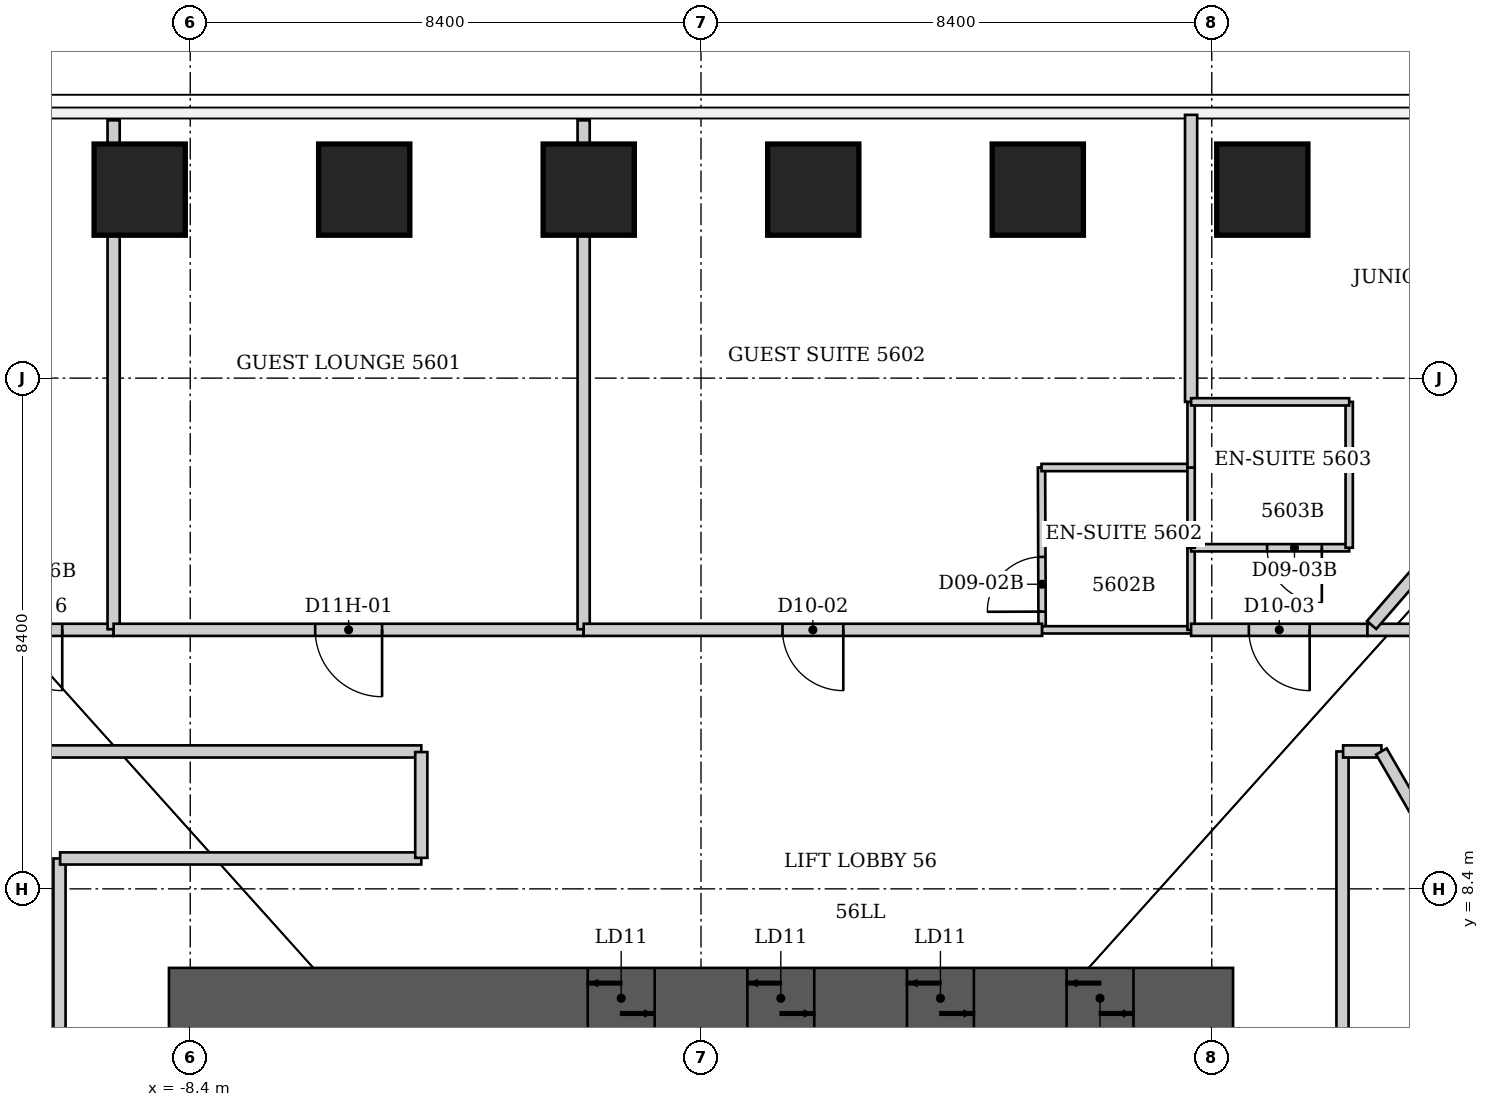
"""IFC4 building model, lengths in metres.
Left out: names, types, materials, properties, quantities, classifications, styles, units other than length and angle.
Written with IfcOpenShell. Run it as: python <this file> out.ifc"""

import sys

from ifc_helpers import new_model, si_unit, direction, frame, frame_2d, origin, origin_2d, place, context, subcontext, project, spatial, rectangle, extrude, element, fill, save


model = new_model("IFC4")
c1 = context("Model", 3, precision=1e-05, world=origin(), true_north=direction((0.0, 1.0)))
c2 = subcontext(c1, "Body", "Model", "MODEL_VIEW")
j1 = project(units=[si_unit("LENGTHUNIT", "METRE"), si_unit("PLANEANGLEUNIT", "RADIAN")], contexts=[c1])
p1 = place(None, origin())
s1 = spatial("IfcSite", under=j1, at=p1, CompositionType="ELEMENT")
p2 = place(p1, origin())
s2 = spatial("IfcBuilding", under=s1, at=p2, CompositionType="ELEMENT")
p3 = place(p2, frame((0.0, 0.0, 225.0)))
s3 = spatial("IfcBuildingStorey", under=s2, at=p3, CompositionType="ELEMENT", Elevation=225.0)
for number, where, z_axis, x_axis in (
    (1, (-9.231, 19.9, 0.0), (0.0, 0.0, 1.0), (0.0, 1.0, 0.0)),
    (2, (-5.539, 19.9, 0.0), (0.0, 0.0, 1.0), (0.0, 1.0, 0.0)),
    (3, (-1.846, 19.9, 0.0), (0.0, 0.0, 1.0), (0.0, 1.0, 0.0)),
    (4, (1.846, 19.9, 0.0), (0.0, 0.0, 1.0), (0.0, 1.0, 0.0)),
    (5, (5.539, 19.9, 0.0), (0.0, 0.0, 1.0), (0.0, 1.0, 0.0)),
    (6, (9.231, 19.9, 0.0), (0.0, 0.0, 1.0), (0.0, 1.0, 0.0)),
):
    element("IfcColumn", number, at=place(p3, frame(where, z_axis=z_axis, x_axis=x_axis)), inside=s3, PredefinedType="COLUMN", context=c2, shape_type="SweptSolid", body=[
        extrude(rectangle(XDim=1.5, YDim=1.5, at=origin_2d()), origin(), (0.0, 0.0, 1.0), 3.8),
    ])
p4 = place(p3, frame((-8.75, 6.6, 0.0), z_axis=(0.0, 0.0, 1.0), x_axis=(1.0, 0.0, 0.0)))
e7 = element("IfcWall", 7, at=p4, inside=s3, PredefinedType="SHEAR", context=c2, shape_type="SweptSolid", body=[
    extrude(rectangle(XDim=17.5, YDim=1.0, at=frame_2d((8.75, 0.0))), origin(), (0.0, 0.0, 1.0), 3.8),
])
p5 = place(p4, frame((6.887, 0.0, 0.0)))
e8 = element("IfcOpeningElement", 8, at=p5, cuts=e7, PredefinedType="OPENING", context=c2, shape_type="SweptSolid", body=[
    extrude(rectangle(XDim=1.1, YDim=2.1, at=frame_2d((0.55, 1.05))), frame((0.0, 0.5, 0.0), z_axis=(0.0, -1.0, 0.0), x_axis=(1.0, 0.0, 0.0)), (0.0, 0.0, 1.0), 1.0),
])
p6 = place(p4, frame((9.512, 0.0, 0.0)))
e9 = element("IfcOpeningElement", 9, at=p6, cuts=e7, PredefinedType="OPENING", context=c2, shape_type="SweptSolid", body=[
    extrude(rectangle(XDim=1.1, YDim=2.1, at=frame_2d((0.55, 1.05))), frame((0.0, 0.5, 0.0), z_axis=(0.0, -1.0, 0.0), x_axis=(1.0, 0.0, 0.0)), (0.0, 0.0, 1.0), 1.0),
])
p7 = place(p4, frame((12.137, 0.0, 0.0)))
e10 = element("IfcOpeningElement", 10, at=p7, cuts=e7, PredefinedType="OPENING", context=c2, shape_type="SweptSolid", body=[
    extrude(rectangle(XDim=1.1, YDim=2.1, at=frame_2d((0.55, 1.05))), frame((0.0, 0.5, 0.0), z_axis=(0.0, -1.0, 0.0), x_axis=(1.0, 0.0, 0.0)), (0.0, 0.0, 1.0), 1.0),
])
p8 = place(p4, frame((14.762, 0.0, 0.0)))
e11 = element("IfcOpeningElement", 11, at=p8, cuts=e7, PredefinedType="OPENING", context=c2, shape_type="SweptSolid", body=[
    extrude(rectangle(XDim=1.1, YDim=2.1, at=frame_2d((0.55, 1.05))), frame((0.0, 0.5, 0.0), z_axis=(0.0, -1.0, 0.0), x_axis=(1.0, 0.0, 0.0)), (0.0, 0.0, 1.0), 1.0),
])
p9 = place(p3, frame((-11.19, 10.66, 0.0), z_axis=(0.0, 0.0, 1.0), x_axis=(1.0, 0.0, 0.0)))
e12 = element("IfcWall", 12, at=p9, inside=s3, PredefinedType="PARTITIONING", context=c2, shape_type="SweptSolid", body=[
    extrude(rectangle(XDim=6.59, YDim=0.2, at=frame_2d((3.295, 0.0))), origin(), (0.0, 0.0, 1.0), 3.64),
])
p10 = place(p3, frame((-10.55, 8.9, 0.0), z_axis=(0.0, 0.0, 1.0), x_axis=(0.0, -1.0, 0.0)))
e13 = element("IfcWall", 13, at=p10, inside=s3, PredefinedType="PARTITIONING", context=c2, shape_type="SweptSolid", body=[
    extrude(rectangle(XDim=11.95, YDim=0.2, at=frame_2d((5.975, 0.0))), origin(), (0.0, 0.0, 1.0), 3.64),
])
p11 = place(p10, frame((5.425, 0.0, 0.0)))
e14 = element("IfcOpeningElement", 14, at=p11, cuts=e13, PredefinedType="OPENING", context=c2, shape_type="SweptSolid", body=[
    extrude(rectangle(XDim=1.1, YDim=2.2, at=frame_2d((0.55, 1.1))), frame((0.0, 0.1, 0.0), z_axis=(0.0, -1.0, 0.0), x_axis=(1.0, 0.0, 0.0)), (0.0, 0.0, 1.0), 0.2),
])
p12 = place(p3, frame((-9.66, 12.66, 0.0), z_axis=(0.0, 0.0, 1.0), x_axis=(-1.0, 0.0, 0.0)))
e15 = element("IfcWall", 15, at=p12, inside=s3, PredefinedType="PARTITIONING", context=c2, shape_type="SweptSolid", body=[
    extrude(rectangle(XDim=2.69, YDim=0.2, at=frame_2d((1.345, 0.0))), origin(), (0.0, 0.0, 1.0), 3.64),
])
p13 = place(p12, frame((0.845, 0.0, 0.0)))
e16 = element("IfcOpeningElement", 16, at=p13, cuts=e15, PredefinedType="OPENING", context=c2, shape_type="SweptSolid", body=[
    extrude(rectangle(XDim=1.0, YDim=2.13, at=frame_2d((0.5, 1.065))), frame((0.0, 0.1, 0.0), z_axis=(0.0, -1.0, 0.0), x_axis=(1.0, 0.0, 0.0)), (0.0, 0.0, 1.0), 0.2),
])
p14 = place(p3, frame((-9.66, 12.67, 0.0), z_axis=(0.0, 0.0, 1.0), x_axis=(0.0, 1.0, 0.0)))
e17 = element("IfcWall", 17, at=p14, inside=s3, PredefinedType="PARTITIONING", context=c2, shape_type="SweptSolid", body=[
    extrude(rectangle(XDim=8.37, YDim=0.2, at=frame_2d((4.185, 0.0))), origin(), (0.0, 0.0, 1.0), 3.64),
])
p15 = place(p3, frame((-4.6, 8.9, 0.0), z_axis=(0.0, 0.0, 1.0), x_axis=(-1.0, 0.0, 0.0)))
e18 = element("IfcWall", 18, at=p15, inside=s3, PredefinedType="PARTITIONING", context=c2, shape_type="SweptSolid", body=[
    extrude(rectangle(XDim=5.94, YDim=0.2, at=frame_2d((2.97, 0.0))), origin(), (0.0, 0.0, 1.0), 3.64),
])
p16 = place(p3, frame((-4.6, 10.65, 0.0), z_axis=(0.0, 0.0, 1.0), x_axis=(0.0, -1.0, 0.0)))
e19 = element("IfcWall", 19, at=p16, inside=s3, PredefinedType="PARTITIONING", context=c2, shape_type="SweptSolid", body=[
    extrude(rectangle(XDim=1.74, YDim=0.2, at=frame_2d((0.87, 0.0))), origin(), (0.0, 0.0, 1.0), 3.64),
])
p17 = place(p3, frame((-1.93, 12.66, 0.0), z_axis=(0.0, 0.0, 1.0), x_axis=(-1.0, 0.0, 0.0)))
e20 = element("IfcWall", 20, at=p17, inside=s3, PredefinedType="PARTITIONING", context=c2, shape_type="SweptSolid", body=[
    extrude(rectangle(XDim=7.73, YDim=0.2, at=frame_2d((3.865, 0.0))), origin(), (0.0, 0.0, 1.0), 3.64),
])
p18 = place(p17, frame((3.315, 0.0, 0.0)))
e21 = element("IfcOpeningElement", 21, at=p18, cuts=e20, PredefinedType="OPENING", context=c2, shape_type="SweptSolid", body=[
    extrude(rectangle(XDim=1.1, YDim=2.2, at=frame_2d((0.55, 1.1))), frame((0.0, 0.1, 0.0), z_axis=(0.0, -1.0, 0.0), x_axis=(1.0, 0.0, 0.0)), (0.0, 0.0, 1.0), 0.2),
])
p19 = place(p3, frame((-1.93, 21.04, 0.0), z_axis=(0.0, 0.0, 1.0), x_axis=(0.0, -1.0, 0.0)))
e22 = element("IfcWall", 22, at=p19, inside=s3, PredefinedType="PARTITIONING", context=c2, shape_type="SweptSolid", body=[
    extrude(rectangle(XDim=8.37, YDim=0.2, at=frame_2d((4.185, 0.0))), origin(), (0.0, 0.0, 1.0), 3.023),
])
p20 = place(p3, frame((5.6, 15.33, 0.0), z_axis=(0.0, 0.0, 1.0), x_axis=(0.003748716459, -0.999992973538, 0.0)))
e23 = element("IfcWall", 23, at=p20, inside=s3, PredefinedType="PARTITIONING", context=c2, shape_type="SweptSolid", body=[
    extrude(rectangle(XDim=2.67, YDim=0.12, at=frame_2d((1.335, 0.0))), origin(), (0.0, 0.0, 1.0), 3.023),
])
p21 = place(p20, frame((1.47, 0.0, 0.0)))
e24 = element("IfcOpeningElement", 24, at=p21, cuts=e23, PredefinedType="OPENING", context=c2, shape_type="SweptSolid", body=[
    extrude(rectangle(XDim=0.9, YDim=2.03, at=frame_2d((0.45, 1.015))), frame((0.0, 0.06, 0.0), z_axis=(0.0, -1.0, 0.0), x_axis=(1.0, 0.0, 0.0)), (0.0, 0.0, 1.0), 0.12),
])
p22 = place(p3, frame((5.61, 12.66, 0.0), z_axis=(0.0, 0.0, 1.0), x_axis=(-1.0, 0.0, 0.0)))
e25 = element("IfcWall", 25, at=p22, inside=s3, PredefinedType="PARTITIONING", context=c2, shape_type="SweptSolid", body=[
    extrude(rectangle(XDim=7.54, YDim=0.2, at=frame_2d((3.77, 0.0))), origin(), (0.0, 0.0, 1.0), 3.64),
])
p23 = place(p22, frame((3.27, 0.0, 0.0)))
e26 = element("IfcOpeningElement", 26, at=p23, cuts=e25, PredefinedType="OPENING", context=c2, shape_type="SweptSolid", body=[
    extrude(rectangle(XDim=1.0, YDim=2.13, at=frame_2d((0.5, 1.065))), frame((0.0, 0.1, 0.0), z_axis=(0.0, -1.0, 0.0), x_axis=(1.0, 0.0, 0.0)), (0.0, 0.0, 1.0), 0.2),
])
p24 = place(p3, frame((8.06, 12.66, 0.0), z_axis=(0.0, 0.0, 1.0), x_axis=(-1.0, 0.0, 0.0)))
e27 = element("IfcWall", 27, at=p24, inside=s3, PredefinedType="PARTITIONING", context=c2, shape_type="SweptSolid", body=[
    extrude(rectangle(XDim=2.45, YDim=0.12, at=frame_2d((1.225, 0.0))), origin(), (0.0, 0.0, 1.0), 3.64),
])
p25 = place(p3, frame((8.06, 14.01, 0.0), z_axis=(0.0, 0.0, 1.0), x_axis=(0.0, -1.0, 0.0)))
e28 = element("IfcWall", 28, at=p25, inside=s3, PredefinedType="PARTITIONING", context=c2, shape_type="SweptSolid", body=[
    extrude(rectangle(XDim=1.35, YDim=0.12, at=frame_2d((0.675, 0.0))), origin(), (0.0, 0.0, 1.0), 3.64),
])
p26 = place(p3, frame((8.06, 14.01, 0.0), z_axis=(0.0, 0.0, 1.0), x_axis=(1.0, 0.0, 0.0)))
e29 = element("IfcWall", 29, at=p26, inside=s3, PredefinedType="PARTITIONING", context=c2, shape_type="SweptSolid", body=[
    extrude(rectangle(XDim=2.6, YDim=0.12, at=frame_2d((1.3, 0.0))), origin(), (0.0, 0.0, 1.0), 3.64),
])
p27 = place(p26, frame((1.25, 0.0, 0.0)))
e30 = element("IfcOpeningElement", 30, at=p27, cuts=e29, PredefinedType="OPENING", context=c2, shape_type="SweptSolid", body=[
    extrude(rectangle(XDim=0.9, YDim=2.03, at=frame_2d((0.45, 1.015))), frame((0.0, 0.06, 0.0), z_axis=(0.0, -1.0, 0.0), x_axis=(1.0, 0.0, 0.0)), (0.0, 0.0, 1.0), 0.12),
])
p28 = place(p3, frame((8.06, 15.33, 0.0), z_axis=(0.0, 0.0, 1.0), x_axis=(-1.0, 0.0, 0.0)))
e31 = element("IfcWall", 31, at=p28, inside=s3, PredefinedType="PARTITIONING", context=c2, shape_type="SweptSolid", body=[
    extrude(rectangle(XDim=2.46, YDim=0.12, at=frame_2d((1.23, 0.0))), origin(), (0.0, 0.0, 1.0), 3.64),
])
p29 = place(p3, frame((8.06, 15.33, 0.0), z_axis=(0.0, 0.0, 1.0), x_axis=(0.0, -1.0, 0.0)))
e32 = element("IfcWall", 32, at=p29, inside=s3, PredefinedType="PARTITIONING", context=c2, shape_type="SweptSolid", body=[
    extrude(rectangle(XDim=1.32, YDim=0.12, at=frame_2d((0.66, 0.0))), origin(), (0.0, 0.0, 1.0), 3.64),
])
p30 = place(p3, frame((8.06, 16.41, 0.0), z_axis=(0.0, 0.0, 1.0), x_axis=(0.0, -1.0, 0.0)))
e33 = element("IfcWall", 33, at=p30, inside=s3, PredefinedType="PARTITIONING", context=c2, shape_type="SweptSolid", body=[
    extrude(rectangle(XDim=1.08, YDim=0.12, at=frame_2d((0.54, 0.0))), origin(), (0.0, 0.0, 1.0), 3.64),
])
p31 = place(p3, frame((8.06, 21.13, 0.0), z_axis=(0.0, 0.0, 1.0), x_axis=(0.0, -1.0, 0.0)))
e34 = element("IfcWall", 34, at=p31, inside=s3, PredefinedType="PARTITIONING", context=c2, shape_type="SweptSolid", body=[
    extrude(rectangle(XDim=4.72, YDim=0.2, at=frame_2d((2.36, 0.0))), origin(), (0.0, 0.0, 1.0), 3.64),
])
p32 = place(p3, frame((10.55, -3.05, 0.0), z_axis=(0.0, 0.0, 1.0), x_axis=(0.0, 1.0, 0.0)))
e35 = element("IfcWall", 35, at=p32, inside=s3, PredefinedType="PARTITIONING", context=c2, shape_type="SweptSolid", body=[
    extrude(rectangle(XDim=13.71, YDim=0.2, at=frame_2d((6.855, 0.0))), origin(), (0.0, 0.0, 1.0), 3.64),
])
p33 = place(p32, frame((6.305, 0.0, 0.0)))
e36 = element("IfcOpeningElement", 36, at=p33, cuts=e35, PredefinedType="OPENING", context=c2, shape_type="SweptSolid", body=[
    extrude(rectangle(XDim=1.1, YDim=2.2, at=frame_2d((0.55, 1.1))), frame((0.0, 0.1, 0.0), z_axis=(0.0, -1.0, 0.0), x_axis=(1.0, 0.0, 0.0)), (0.0, 0.0, 1.0), 0.2),
])
p34 = place(p3, frame((10.56, 10.66, 0.0), z_axis=(0.0, 0.0, 1.0), x_axis=(1.0, 0.0, 0.0)))
e37 = element("IfcWall", 37, at=p34, inside=s3, PredefinedType="PARTITIONING", context=c2, shape_type="SweptSolid", body=[
    extrude(rectangle(XDim=0.63, YDim=0.2, at=frame_2d((0.315, 0.0))), origin(), (0.0, 0.0, 1.0), 3.64),
])
p35 = place(p3, frame((10.66, 14.01, 0.0), z_axis=(0.0, 0.0, 1.0), x_axis=(0.0, 1.0, 0.0)))
e38 = element("IfcWall", 38, at=p35, inside=s3, PredefinedType="PARTITIONING", context=c2, shape_type="SweptSolid", body=[
    extrude(rectangle(XDim=2.4, YDim=0.12, at=frame_2d((1.2, 0.0))), origin(), (0.0, 0.0, 1.0), 3.64),
])
p36 = place(p3, frame((10.66, 16.41, 0.0), z_axis=(0.0, 0.0, 1.0), x_axis=(-1.0, 0.0, 0.0)))
e39 = element("IfcWall", 39, at=p36, inside=s3, PredefinedType="PARTITIONING", context=c2, shape_type="SweptSolid", body=[
    extrude(rectangle(XDim=2.6, YDim=0.12, at=frame_2d((1.3, 0.0))), origin(), (0.0, 0.0, 1.0), 3.64),
])
p37 = place(p3, frame((10.96, 12.66, 0.0), z_axis=(0.0, 0.0, 1.0), x_axis=(-1.0, 0.0, 0.0)))
e40 = element("IfcWall", 40, at=p37, inside=s3, PredefinedType="PARTITIONING", context=c2, shape_type="SweptSolid", body=[
    extrude(rectangle(XDim=2.9, YDim=0.2, at=frame_2d((1.45, 0.0))), origin(), (0.0, 0.0, 1.0), 3.64),
])
p38 = place(p37, frame((0.95, 0.0, 0.0)))
e41 = element("IfcOpeningElement", 41, at=p38, cuts=e40, PredefinedType="OPENING", context=c2, shape_type="SweptSolid", body=[
    extrude(rectangle(XDim=1.0, YDim=2.13, at=frame_2d((0.5, 1.065))), frame((0.0, 0.1, 0.0), z_axis=(0.0, -1.0, 0.0), x_axis=(1.0, 0.0, 0.0)), (0.0, 0.0, 1.0), 0.2),
])
p39 = place(p3, frame((11.19, 10.66, 0.0), z_axis=(0.0, 0.0, 1.0), x_axis=(0.500899863475, -0.865505243642, 0.0)))
e42 = element("IfcWall", 42, at=p39, inside=s3, PredefinedType="PARTITIONING", context=c2, shape_type="SweptSolid", body=[
    extrude(rectangle(XDim=7.267, YDim=0.2, at=frame_2d((3.634, 0.0))), origin(), (0.0, 0.0, 1.0), 3.64),
])
p40 = place(p3, frame((12.35, 12.66, 0.0), z_axis=(0.0, 0.0, 1.0), x_axis=(-1.0, 0.0, 0.0)))
e43 = element("IfcWall", 43, at=p40, inside=s3, PredefinedType="PARTITIONING", context=c2, shape_type="SweptSolid", body=[
    extrude(rectangle(XDim=1.39, YDim=0.2, at=frame_2d((0.695, 0.0))), origin(), (0.0, 0.0, 1.0), 3.64),
])
p41 = place(p3, frame((18.02, 20.817, 0.0), z_axis=(0.0, 0.0, 1.0), x_axis=(-0.654429261747, -0.756123231603, 0.0)))
e44 = element("IfcWall", 44, at=p41, inside=s3, PredefinedType="PARTITIONING", context=c2, shape_type="SweptSolid", body=[
    extrude(rectangle(XDim=10.683, YDim=0.2, at=frame_2d((5.342, 0.0))), origin(), (0.0, 0.0, 1.0), 3.64),
])
p42 = place(p18, origin())
e45 = element("IfcDoor", 45, at=p42, inside=s3, OperationType="SINGLE_SWING_LEFT", PredefinedType="DOOR", context=c2, shape_type="SweptSolid", body=[
    extrude(rectangle(XDim=1.1, YDim=2.2, at=frame_2d((0.55, 1.1))), frame((0.0, 0.025, 0.0), z_axis=(0.0, -1.0, 0.0), x_axis=(1.0, 0.0, 0.0)), (0.0, 0.0, 1.0), 0.05),
])
fill(e21, e45)
p43 = place(p23, origin())
e46 = element("IfcDoor", 46, at=p43, inside=s3, OperationType="SINGLE_SWING_LEFT", PredefinedType="DOOR", context=c2, shape_type="SweptSolid", body=[
    extrude(rectangle(XDim=1.0, YDim=2.13, at=frame_2d((0.5, 1.065))), frame((0.0, 0.025, 0.0), z_axis=(0.0, -1.0, 0.0), x_axis=(1.0, 0.0, 0.0)), (0.0, 0.0, 1.0), 0.05),
])
fill(e26, e46)
p44 = place(p21, origin())
e47 = element("IfcDoor", 47, at=p44, inside=s3, OperationType="SINGLE_SWING_RIGHT", PredefinedType="DOOR", context=c2, shape_type="SweptSolid", body=[
    extrude(rectangle(XDim=0.9, YDim=2.03, at=frame_2d((0.45, 1.015))), frame((0.0, 0.025, 0.0), z_axis=(0.0, -1.0, 0.0), x_axis=(1.0, 0.0, 0.0)), (0.0, 0.0, 1.0), 0.05),
])
fill(e24, e47)
p45 = place(p38, origin())
e48 = element("IfcDoor", 48, at=p45, inside=s3, OperationType="SINGLE_SWING_LEFT", PredefinedType="DOOR", context=c2, shape_type="SweptSolid", body=[
    extrude(rectangle(XDim=1.0, YDim=2.13, at=frame_2d((0.5, 1.065))), frame((0.0, 0.025, 0.0), z_axis=(0.0, -1.0, 0.0), x_axis=(1.0, 0.0, 0.0)), (0.0, 0.0, 1.0), 0.05),
])
fill(e41, e48)
p46 = place(p27, origin())
e49 = element("IfcDoor", 49, at=p46, inside=s3, OperationType="SINGLE_SWING_RIGHT", PredefinedType="DOOR", context=c2, shape_type="SweptSolid", body=[
    extrude(rectangle(XDim=0.9, YDim=2.03, at=frame_2d((0.45, 1.015))), frame((0.0, 0.025, 0.0), z_axis=(0.0, -1.0, 0.0), x_axis=(1.0, 0.0, 0.0)), (0.0, 0.0, 1.0), 0.05),
])
fill(e30, e49)
p47 = place(p13, origin())
e50 = element("IfcDoor", 50, at=p47, inside=s3, OperationType="SINGLE_SWING_LEFT", PredefinedType="DOOR", context=c2, shape_type="SweptSolid", body=[
    extrude(rectangle(XDim=1.0, YDim=2.13, at=frame_2d((0.5, 1.065))), frame((0.0, 0.025, 0.0), z_axis=(0.0, -1.0, 0.0), x_axis=(1.0, 0.0, 0.0)), (0.0, 0.0, 1.0), 0.05),
])
fill(e16, e50)
p48 = place(p5, origin())
e51 = element("IfcDoor", 51, at=p48, inside=s3, OperationType="DOUBLE_DOOR_SLIDING", PredefinedType="DOOR", context=c2, shape_type="SweptSolid", body=[
    extrude(rectangle(XDim=1.1, YDim=2.1, at=frame_2d((0.55, 1.05))), frame((0.0, 0.025, 0.0), z_axis=(0.0, -1.0, 0.0), x_axis=(1.0, 0.0, 0.0)), (0.0, 0.0, 1.0), 0.05),
])
fill(e8, e51)
p49 = place(p6, origin())
e52 = element("IfcDoor", 52, at=p49, inside=s3, OperationType="DOUBLE_DOOR_SLIDING", PredefinedType="DOOR", context=c2, shape_type="SweptSolid", body=[
    extrude(rectangle(XDim=1.1, YDim=2.1, at=frame_2d((0.55, 1.05))), frame((0.0, 0.025, 0.0), z_axis=(0.0, -1.0, 0.0), x_axis=(1.0, 0.0, 0.0)), (0.0, 0.0, 1.0), 0.05),
])
fill(e9, e52)
p50 = place(p7, origin())
e53 = element("IfcDoor", 53, at=p50, inside=s3, OperationType="DOUBLE_DOOR_SLIDING", PredefinedType="DOOR", context=c2, shape_type="SweptSolid", body=[
    extrude(rectangle(XDim=1.1, YDim=2.1, at=frame_2d((0.55, 1.05))), frame((0.0, 0.025, 0.0), z_axis=(0.0, -1.0, 0.0), x_axis=(1.0, 0.0, 0.0)), (0.0, 0.0, 1.0), 0.05),
])
fill(e10, e53)
p51 = place(p8, origin())
e54 = element("IfcDoor", 54, at=p51, inside=s3, OperationType="DOUBLE_DOOR_SLIDING", PredefinedType="DOOR", context=c2, shape_type="SweptSolid", body=[
    extrude(rectangle(XDim=1.1, YDim=2.1, at=frame_2d((0.55, 1.05))), frame((0.0, 0.025, 0.0), z_axis=(0.0, -1.0, 0.0), x_axis=(1.0, 0.0, 0.0)), (0.0, 0.0, 1.0), 0.05),
])
fill(e11, e54)
save(model, sys.argv[1])
